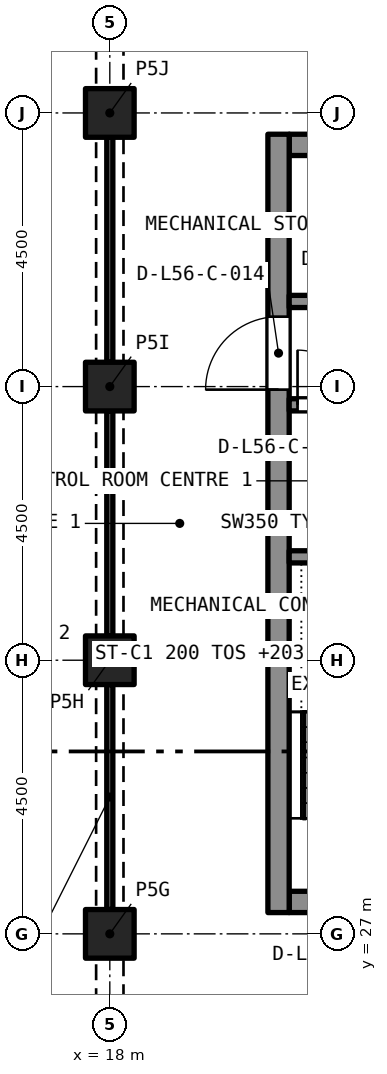
"""IFC4 building model, lengths in metres.
Left out: names, types, materials, properties, quantities, classifications, styles, units other than length and angle.
Written with IfcOpenShell. Run it as: python <this file> out.ifc"""

import sys

from ifc_helpers import new_model, si_unit, direction, frame, frame_2d, origin, origin_2d, place, context, subcontext, project, spatial, rectangle, extrude, element, fill, save


model = new_model("IFC4")
c1 = context("Model", 3, precision=1e-05, world=origin(), true_north=direction((0.0, 1.0)))
c2 = subcontext(c1, "Body", "Model", "MODEL_VIEW")
j1 = project(units=[si_unit("LENGTHUNIT", "METRE"), si_unit("PLANEANGLEUNIT", "RADIAN")], contexts=[c1])
p1 = place(None, origin())
s1 = spatial("IfcSite", under=j1, at=p1, CompositionType="ELEMENT")
p2 = place(p1, origin())
s2 = spatial("IfcBuilding", under=s1, at=p2, CompositionType="ELEMENT")
p3 = place(p2, frame((0.0, 0.0, 201.9)))
s3 = spatial("IfcBuildingStorey", under=s2, at=p3, CompositionType="ELEMENT", Elevation=201.9)
for number, where, z_axis, x_axis in (
    (1, (18.0, 27.0, 0.0), (0.0, 0.0, 1.0), (1.0, 0.0, 0.0)),
    (2, (18.0, 31.5, 0.0), (0.0, 0.0, 1.0), (1.0, 0.0, 0.0)),
    (3, (18.0, 36.0, 0.0), (0.0, 0.0, 1.0), (1.0, 0.0, 0.0)),
    (4, (18.0, 40.5, 0.0), (0.0, 0.0, 1.0), (1.0, 0.0, 0.0)),
):
    element("IfcColumn", number, at=place(p3, frame(where, z_axis=z_axis, x_axis=x_axis)), inside=s3, PredefinedType="COLUMN", context=c2, shape_type="SweptSolid", body=[
        extrude(rectangle(XDim=0.8, YDim=0.8, at=origin_2d()), origin(), (0.0, 0.0, 1.0), 4.995),
    ])
p4 = place(p3, frame((20.95, 27.525, 0.0), z_axis=(0.0, 0.0, 1.0), x_axis=(1.0, 0.0, 0.0)))
e5 = element("IfcWall", 5, at=p4, inside=s3, PredefinedType="SOLIDWALL", context=c2, shape_type="SweptSolid", body=[
    extrude(rectangle(XDim=7.6, YDim=0.35, at=frame_2d((3.8, 0.0))), origin(), (0.0, 0.0, 1.0), 4.995),
])
p5 = place(p4, frame((0.725, 0.0, 0.0)))
e6 = element("IfcOpeningElement", 6, at=p5, cuts=e5, PredefinedType="OPENING", context=c2, shape_type="SweptSolid", body=[
    extrude(rectangle(XDim=1.1, YDim=2.1, at=frame_2d((0.55, 1.05))), frame((0.0, 0.185, 0.0), z_axis=(0.0, -1.0, 0.0), x_axis=(1.0, 0.0, 0.0)), (0.0, 0.0, 1.0), 0.37),
])
p6 = place(p4, frame((3.25, 0.0, 0.0)))
e7 = element("IfcOpeningElement", 7, at=p6, cuts=e5, PredefinedType="OPENING", context=c2, shape_type="SweptSolid", body=[
    extrude(rectangle(XDim=1.1, YDim=2.1, at=frame_2d((0.55, 1.05))), frame((0.0, 0.185, 0.0), z_axis=(0.0, -1.0, 0.0), x_axis=(1.0, 0.0, 0.0)), (0.0, 0.0, 1.0), 0.37),
])
p7 = place(p4, frame((5.775, 0.0, 0.0)))
e8 = element("IfcOpeningElement", 8, at=p7, cuts=e5, PredefinedType="OPENING", context=c2, shape_type="SweptSolid", body=[
    extrude(rectangle(XDim=1.1, YDim=2.1, at=frame_2d((0.55, 1.05))), frame((0.0, 0.185, 0.0), z_axis=(0.0, -1.0, 0.0), x_axis=(1.0, 0.0, 0.0)), (0.0, 0.0, 1.0), 0.37),
])
p8 = place(p3, frame((20.95, 39.975, 0.0), z_axis=(0.0, 0.0, 1.0), x_axis=(1.0, 0.0, 0.0)))
e9 = element("IfcWall", 9, at=p8, inside=s3, PredefinedType="SOLIDWALL", context=c2, shape_type="SweptSolid", body=[
    extrude(rectangle(XDim=7.6, YDim=0.35, at=frame_2d((3.8, 0.0))), origin(), (0.0, 0.0, 1.0), 4.995),
])
p9 = place(p3, frame((20.775, 27.35, 0.0), z_axis=(0.0, 0.0, 1.0), x_axis=(0.0, 1.0, 0.0)))
e10 = element("IfcWall", 10, at=p9, inside=s3, PredefinedType="SOLIDWALL", context=c2, shape_type="SweptSolid", body=[
    extrude(rectangle(XDim=12.8, YDim=0.35, at=frame_2d((6.4, 0.0))), origin(), (0.0, 0.0, 1.0), 4.995),
])
p10 = place(p9, frame((8.6, 0.0, 0.0)))
e11 = element("IfcOpeningElement", 11, at=p10, cuts=e10, PredefinedType="OPENING", context=c2, shape_type="SweptSolid", body=[
    extrude(rectangle(XDim=1.2, YDim=2.1, at=frame_2d((0.6, 1.05))), frame((0.0, 0.185, 0.0), z_axis=(0.0, -1.0, 0.0), x_axis=(1.0, 0.0, 0.0)), (0.0, 0.0, 1.0), 0.37),
])
p11 = place(p3, frame((20.95, 33.2, 0.0), z_axis=(0.0, 0.0, 1.0), x_axis=(1.0, 0.0, 0.0)))
e12 = element("IfcWall", 12, at=p11, inside=s3, PredefinedType="SOLIDWALL", context=c2, shape_type="SweptSolid", body=[
    extrude(rectangle(XDim=7.6, YDim=0.2, at=frame_2d((3.8, 0.0))), origin(), (0.0, 0.0, 1.0), 4.695),
])
p12 = place(p11, frame((3.35, 0.0, 0.0)))
e13 = element("IfcOpeningElement", 13, at=p12, cuts=e12, PredefinedType="OPENING", context=c2, shape_type="SweptSolid", body=[
    extrude(rectangle(XDim=0.9, YDim=2.1, at=frame_2d((0.45, 1.05))), frame((0.0, 0.11, 0.0), z_axis=(0.0, -1.0, 0.0), x_axis=(1.0, 0.0, 0.0)), (0.0, 0.0, 1.0), 0.22),
])
p13 = place(p3, frame((20.95, 35.7, 0.0), z_axis=(0.0, 0.0, 1.0), x_axis=(1.0, 0.0, 0.0)))
e14 = element("IfcWall", 14, at=p13, inside=s3, PredefinedType="SOLIDWALL", context=c2, shape_type="SweptSolid", body=[
    extrude(rectangle(XDim=7.6, YDim=0.2, at=frame_2d((3.8, 0.0))), origin(), (0.0, 0.0, 1.0), 4.695),
])
p14 = place(p13, frame((0.137, 0.0, 0.0)))
e15 = element("IfcOpeningElement", 15, at=p14, cuts=e14, PredefinedType="OPENING", context=c2, shape_type="SweptSolid", body=[
    extrude(rectangle(XDim=0.9, YDim=2.1, at=frame_2d((0.45, 1.05))), frame((0.0, 0.11, 0.0), z_axis=(0.0, -1.0, 0.0), x_axis=(1.0, 0.0, 0.0)), (0.0, 0.0, 1.0), 0.22),
])
p15 = place(p13, frame((1.512, 0.0, 0.0)))
e16 = element("IfcOpeningElement", 16, at=p15, cuts=e14, PredefinedType="OPENING", context=c2, shape_type="SweptSolid", body=[
    extrude(rectangle(XDim=0.9, YDim=2.1, at=frame_2d((0.45, 1.05))), frame((0.0, 0.11, 0.0), z_axis=(0.0, -1.0, 0.0), x_axis=(1.0, 0.0, 0.0)), (0.0, 0.0, 1.0), 0.22),
])
p16 = place(p13, frame((5.875, 0.0, 0.0)))
e17 = element("IfcOpeningElement", 17, at=p16, cuts=e14, PredefinedType="OPENING", context=c2, shape_type="SweptSolid", body=[
    extrude(rectangle(XDim=0.9, YDim=2.1, at=frame_2d((0.45, 1.05))), frame((0.0, 0.11, 0.0), z_axis=(0.0, -1.0, 0.0), x_axis=(1.0, 0.0, 0.0)), (0.0, 0.0, 1.0), 0.22),
])
p17 = place(p3, frame((20.95, 37.4, 0.0), z_axis=(0.0, 0.0, 1.0), x_axis=(1.0, 0.0, 0.0)))
e18 = element("IfcWall", 18, at=p17, inside=s3, PredefinedType="SOLIDWALL", context=c2, shape_type="SweptSolid", body=[
    extrude(rectangle(XDim=7.6, YDim=0.2, at=frame_2d((3.8, 0.0))), origin(), (0.0, 0.0, 1.0), 4.695),
])
p18 = place(p17, frame((6.15, 0.0, 0.0)))
e19 = element("IfcOpeningElement", 19, at=p18, cuts=e18, PredefinedType="OPENING", context=c2, shape_type="SweptSolid", body=[
    extrude(rectangle(XDim=0.7, YDim=2.1, at=frame_2d((0.35, 1.05))), frame((0.0, 0.11, 0.0), z_axis=(0.0, -1.0, 0.0), x_axis=(1.0, 0.0, 0.0)), (0.0, 0.0, 1.0), 0.22),
])
p19 = place(p17, frame((0.8, 0.0, 0.0)))
e20 = element("IfcOpeningElement", 20, at=p19, cuts=e18, PredefinedType="OPENING", context=c2, shape_type="SweptSolid", body=[
    extrude(rectangle(XDim=0.9, YDim=2.1, at=frame_2d((0.45, 1.05))), frame((0.0, 0.11, 0.0), z_axis=(0.0, -1.0, 0.0), x_axis=(1.0, 0.0, 0.0)), (0.0, 0.0, 1.0), 0.22),
])
p20 = place(p17, frame((2.825, 0.0, 0.0)))
e21 = element("IfcOpeningElement", 21, at=p20, cuts=e18, PredefinedType="OPENING", context=c2, shape_type="SweptSolid", body=[
    extrude(rectangle(XDim=0.9, YDim=2.1, at=frame_2d((0.45, 1.05))), frame((0.0, 0.11, 0.0), z_axis=(0.0, -1.0, 0.0), x_axis=(1.0, 0.0, 0.0)), (0.0, 0.0, 1.0), 0.22),
])
p21 = place(p17, frame((4.175, 0.0, 0.0)))
e22 = element("IfcOpeningElement", 22, at=p21, cuts=e18, PredefinedType="OPENING", context=c2, shape_type="SweptSolid", body=[
    extrude(rectangle(XDim=0.9, YDim=2.1, at=frame_2d((0.45, 1.05))), frame((0.0, 0.11, 0.0), z_axis=(0.0, -1.0, 0.0), x_axis=(1.0, 0.0, 0.0)), (0.0, 0.0, 1.0), 0.22),
])
for number, where, z_axis, x_axis in (
    (23, (18.0, 27.4, 0.0), (0.0, 0.0, 1.0), (0.0, 1.0, 0.0)),
    (24, (18.0, 31.9, 0.0), (0.0, 0.0, 1.0), (0.0, 1.0, 0.0)),
    (25, (18.0, 36.4, 0.0), (0.0, 0.0, 1.0), (0.0, 1.0, 0.0)),
):
    element("IfcWall", number, at=place(p3, frame(where, z_axis=z_axis, x_axis=x_axis)), inside=s3, PredefinedType="PARTITIONING", context=c2, shape_type="SweptSolid", body=[
        extrude(rectangle(XDim=3.7, YDim=0.1, at=frame_2d((1.85, 0.0))), origin(), (0.0, 0.0, 1.0), 4.175),
    ])
p22 = place(p14, origin())
e26 = element("IfcDoor", 26, at=p22, inside=s3, OperationType="SINGLE_SWING_LEFT", PredefinedType="DOOR", context=c2, shape_type="SweptSolid", body=[
    extrude(rectangle(XDim=0.9, YDim=2.1, at=frame_2d((0.45, 1.05))), frame((0.0, 0.025, 0.0), z_axis=(0.0, -1.0, 0.0), x_axis=(1.0, 0.0, 0.0)), (0.0, 0.0, 1.0), 0.05),
])
fill(e15, e26)
p23 = place(p10, origin())
e27 = element("IfcDoor", 27, at=p23, inside=s3, OperationType="SINGLE_SWING_LEFT", PredefinedType="DOOR", context=c2, shape_type="SweptSolid", body=[
    extrude(rectangle(XDim=1.2, YDim=2.1, at=frame_2d((0.6, 1.05))), frame((0.0, 0.025, 0.0), z_axis=(0.0, -1.0, 0.0), x_axis=(1.0, 0.0, 0.0)), (0.0, 0.0, 1.0), 0.05),
])
fill(e11, e27)
save(model, sys.argv[1])
